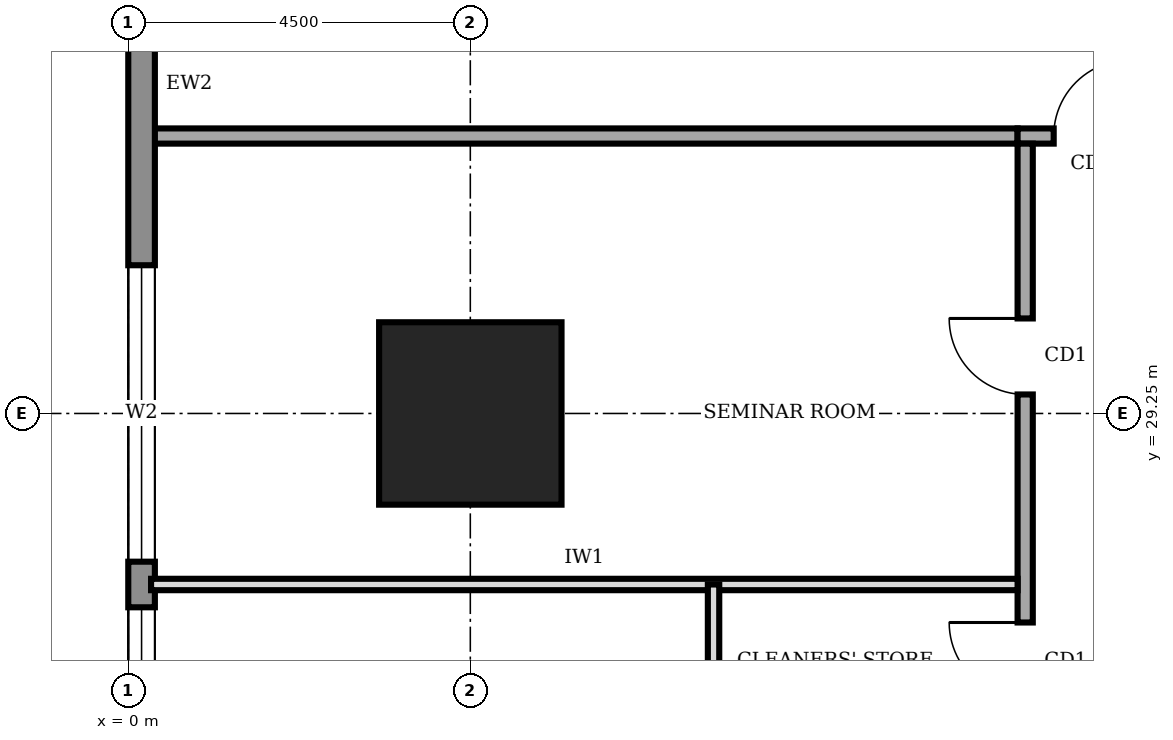
"""IFC4 building model, lengths in metres.
Left out: names, types, materials, properties, quantities, classifications, styles, units other than length and angle.
Written with IfcOpenShell. Run it as: python <this file> out.ifc"""

import sys

from ifc_helpers import new_model, si_unit, direction, frame, frame_2d, origin, origin_2d, place, context, subcontext, project, spatial, rectangle, extrude, element, fill, save


model = new_model("IFC4")
c1 = context("Model", 3, precision=1e-05, world=origin(), true_north=direction((0.0, 1.0)))
c2 = subcontext(c1, "Body", "Model", "MODEL_VIEW")
j1 = project(units=[si_unit("LENGTHUNIT", "METRE"), si_unit("PLANEANGLEUNIT", "RADIAN")], contexts=[c1])
p1 = place(None, origin())
s1 = spatial("IfcSite", under=j1, at=p1, CompositionType="ELEMENT")
p2 = place(p1, origin())
s2 = spatial("IfcBuilding", under=s1, at=p2, CompositionType="ELEMENT")
p3 = place(p2, frame((0.0, 0.0, 49.0)))
s3 = spatial("IfcBuildingStorey", under=s2, at=p3, CompositionType="ELEMENT", Elevation=49.0)
p4 = place(p3, frame((4.5, 29.25, 0.0), z_axis=(0.0, 0.0, 1.0), x_axis=(1.0, 0.0, 0.0)))
e1 = element("IfcColumn", 1, at=p4, inside=s3, PredefinedType="COLUMN", context=c2, shape_type="SweptSolid", body=[
    extrude(rectangle(XDim=2.4, YDim=2.4, at=origin_2d()), origin(), (0.0, 0.0, 1.0), 4.0),
])
p5 = place(p3, frame((0.175, 35.98, 0.0), z_axis=(0.0, 0.0, 1.0), x_axis=(0.0, -1.0, 0.0)))
e2 = element("IfcWall", 2, at=p5, inside=s3, PredefinedType="STANDARD", context=c2, shape_type="SweptSolid", body=[
    extrude(rectangle(XDim=31.46, YDim=0.35, at=frame_2d((15.73, 0.0))), origin(), (0.0, 0.0, 1.0), 3.75),
])
p6 = place(p5, frame((27.21, 0.0, 0.6)))
e3 = element("IfcOpeningElement", 3, at=p6, cuts=e2, PredefinedType="OPENING", context=c2, shape_type="SweptSolid", body=[
    extrude(rectangle(XDim=3.9, YDim=2.6, at=frame_2d((1.95, 1.3))), frame((0.0, 0.185, 0.0), z_axis=(0.0, -1.0, 0.0), x_axis=(1.0, 0.0, 0.0)), (0.0, 0.0, 1.0), 0.37),
])
p7 = place(p5, frame((22.78, 0.0, 0.6)))
e4 = element("IfcOpeningElement", 4, at=p7, cuts=e2, PredefinedType="OPENING", context=c2, shape_type="SweptSolid", body=[
    extrude(rectangle(XDim=3.9, YDim=2.6, at=frame_2d((1.95, 1.3))), frame((0.0, 0.185, 0.0), z_axis=(0.0, -1.0, 0.0), x_axis=(1.0, 0.0, 0.0)), (0.0, 0.0, 1.0), 0.37),
])
p8 = place(p5, frame((18.28, 0.0, 0.6)))
e5 = element("IfcOpeningElement", 5, at=p8, cuts=e2, PredefinedType="OPENING", context=c2, shape_type="SweptSolid", body=[
    extrude(rectangle(XDim=3.9, YDim=2.6, at=frame_2d((1.95, 1.3))), frame((0.0, 0.185, 0.0), z_axis=(0.0, -1.0, 0.0), x_axis=(1.0, 0.0, 0.0)), (0.0, 0.0, 1.0), 0.37),
])
p9 = place(p5, frame((13.78, 0.0, 0.6)))
e6 = element("IfcOpeningElement", 6, at=p9, cuts=e2, PredefinedType="OPENING", context=c2, shape_type="SweptSolid", body=[
    extrude(rectangle(XDim=3.9, YDim=2.6, at=frame_2d((1.95, 1.3))), frame((0.0, 0.185, 0.0), z_axis=(0.0, -1.0, 0.0), x_axis=(1.0, 0.0, 0.0)), (0.0, 0.0, 1.0), 0.37),
])
p10 = place(p5, frame((9.28, 0.0, 0.6)))
e7 = element("IfcOpeningElement", 7, at=p10, cuts=e2, PredefinedType="OPENING", context=c2, shape_type="SweptSolid", body=[
    extrude(rectangle(XDim=3.9, YDim=2.6, at=frame_2d((1.95, 1.3))), frame((0.0, 0.185, 0.0), z_axis=(0.0, -1.0, 0.0), x_axis=(1.0, 0.0, 0.0)), (0.0, 0.0, 1.0), 0.37),
])
p11 = place(p5, frame((4.78, 0.0, 0.6)))
e8 = element("IfcOpeningElement", 8, at=p11, cuts=e2, PredefinedType="OPENING", context=c2, shape_type="SweptSolid", body=[
    extrude(rectangle(XDim=3.9, YDim=2.6, at=frame_2d((1.95, 1.3))), frame((0.0, 0.185, 0.0), z_axis=(0.0, -1.0, 0.0), x_axis=(1.0, 0.0, 0.0)), (0.0, 0.0, 1.0), 0.37),
])
p12 = place(p3, frame((28.6, 32.9, 0.0), z_axis=(0.0, 0.0, 1.0), x_axis=(-1.0, 0.0, 0.0)))
e9 = element("IfcWall", 9, at=p12, inside=s3, PredefinedType="SOLIDWALL", context=c2, shape_type="SweptSolid", body=[
    extrude(rectangle(XDim=16.9, YDim=0.2, at=frame_2d((8.45, 0.0))), origin(), (0.0, 0.0, 1.0), 3.75),
])
p13 = place(p12, frame((15.425, 0.0, 0.0)))
e10 = element("IfcOpeningElement", 10, at=p13, cuts=e9, PredefinedType="OPENING", context=c2, shape_type="SweptSolid", body=[
    extrude(rectangle(XDim=1.0, YDim=2.1, at=frame_2d((0.5, 1.05))), frame((0.0, 0.11, 0.0), z_axis=(0.0, -1.0, 0.0), x_axis=(1.0, 0.0, 0.0)), (0.0, 0.0, 1.0), 0.22),
])
p14 = place(p12, frame((12.35, 0.0, 0.0)))
e11 = element("IfcOpeningElement", 11, at=p14, cuts=e9, PredefinedType="OPENING", context=c2, shape_type="SweptSolid", body=[
    extrude(rectangle(XDim=1.0, YDim=2.1, at=frame_2d((0.5, 1.05))), frame((0.0, 0.11, 0.0), z_axis=(0.0, -1.0, 0.0), x_axis=(1.0, 0.0, 0.0)), (0.0, 0.0, 1.0), 0.22),
])
p15 = place(p12, frame((5.6, 0.0, 0.0)))
e12 = element("IfcOpeningElement", 12, at=p15, cuts=e9, PredefinedType="OPENING", context=c2, shape_type="SweptSolid", body=[
    extrude(rectangle(XDim=1.0, YDim=2.1, at=frame_2d((0.5, 1.05))), frame((0.0, 0.11, 0.0), z_axis=(0.0, -1.0, 0.0), x_axis=(1.0, 0.0, 0.0)), (0.0, 0.0, 1.0), 0.22),
])
p16 = place(p12, frame((0.275, 0.0, 0.0)))
e13 = element("IfcOpeningElement", 13, at=p16, cuts=e9, PredefinedType="OPENING", context=c2, shape_type="SweptSolid", body=[
    extrude(rectangle(XDim=1.0, YDim=2.1, at=frame_2d((0.5, 1.05))), frame((0.0, 0.11, 0.0), z_axis=(0.0, -1.0, 0.0), x_axis=(1.0, 0.0, 0.0)), (0.0, 0.0, 1.0), 0.22),
])
p17 = place(p3, frame((11.8, 32.8, 0.0), z_axis=(0.0, 0.0, 1.0), x_axis=(0.0, -1.0, 0.0)))
e14 = element("IfcWall", 14, at=p17, inside=s3, PredefinedType="SOLIDWALL", context=c2, shape_type="SweptSolid", body=[
    extrude(rectangle(XDim=23.8, YDim=0.2, at=frame_2d((11.9, 0.0))), origin(), (0.0, 0.0, 1.0), 3.75),
])
p18 = place(p17, frame((21.05, 0.0, 0.0)))
e15 = element("IfcOpeningElement", 15, at=p18, cuts=e14, PredefinedType="OPENING", context=c2, shape_type="SweptSolid", body=[
    extrude(rectangle(XDim=1.0, YDim=2.1, at=frame_2d((0.5, 1.05))), frame((0.0, 0.11, 0.0), z_axis=(0.0, -1.0, 0.0), x_axis=(1.0, 0.0, 0.0)), (0.0, 0.0, 1.0), 0.22),
])
p19 = place(p17, frame((17.15, 0.0, 0.0)))
e16 = element("IfcOpeningElement", 16, at=p19, cuts=e14, PredefinedType="OPENING", context=c2, shape_type="SweptSolid", body=[
    extrude(rectangle(XDim=0.9, YDim=2.1, at=frame_2d((0.45, 1.05))), frame((0.0, 0.11, 0.0), z_axis=(0.0, -1.0, 0.0), x_axis=(1.0, 0.0, 0.0)), (0.0, 0.0, 1.0), 0.22),
])
p20 = place(p17, frame((12.35, 0.0, 0.0)))
e17 = element("IfcOpeningElement", 17, at=p20, cuts=e14, PredefinedType="OPENING", context=c2, shape_type="SweptSolid", body=[
    extrude(rectangle(XDim=0.9, YDim=2.1, at=frame_2d((0.45, 1.05))), frame((0.0, 0.11, 0.0), z_axis=(0.0, -1.0, 0.0), x_axis=(1.0, 0.0, 0.0)), (0.0, 0.0, 1.0), 0.22),
])
p21 = place(p17, frame((9.3, 0.0, 0.0)))
e18 = element("IfcOpeningElement", 18, at=p21, cuts=e14, PredefinedType="OPENING", context=c2, shape_type="SweptSolid", body=[
    extrude(rectangle(XDim=0.9, YDim=2.1, at=frame_2d((0.45, 1.05))), frame((0.0, 0.11, 0.0), z_axis=(0.0, -1.0, 0.0), x_axis=(1.0, 0.0, 0.0)), (0.0, 0.0, 1.0), 0.22),
])
p22 = place(p17, frame((6.3, 0.0, 0.0)))
e19 = element("IfcOpeningElement", 19, at=p22, cuts=e14, PredefinedType="OPENING", context=c2, shape_type="SweptSolid", body=[
    extrude(rectangle(XDim=1.0, YDim=2.1, at=frame_2d((0.5, 1.05))), frame((0.0, 0.11, 0.0), z_axis=(0.0, -1.0, 0.0), x_axis=(1.0, 0.0, 0.0)), (0.0, 0.0, 1.0), 0.22),
])
p23 = place(p17, frame((14.4, 0.0, 0.0)))
e20 = element("IfcOpeningElement", 20, at=p23, cuts=e14, PredefinedType="OPENING", context=c2, shape_type="SweptSolid", body=[
    extrude(rectangle(XDim=1.0, YDim=2.1, at=frame_2d((0.5, 1.05))), frame((0.0, 0.11, 0.0), z_axis=(0.0, -1.0, 0.0), x_axis=(1.0, 0.0, 0.0)), (0.0, 0.0, 1.0), 0.22),
])
p24 = place(p17, frame((2.3, 0.0, 0.0)))
e21 = element("IfcOpeningElement", 21, at=p24, cuts=e14, PredefinedType="OPENING", context=c2, shape_type="SweptSolid", body=[
    extrude(rectangle(XDim=1.0, YDim=2.1, at=frame_2d((0.5, 1.05))), frame((0.0, 0.11, 0.0), z_axis=(0.0, -1.0, 0.0), x_axis=(1.0, 0.0, 0.0)), (0.0, 0.0, 1.0), 0.22),
])
p25 = place(p3, frame((0.3, 32.9, 0.0), z_axis=(0.0, 0.0, 1.0), x_axis=(1.0, 0.0, 0.0)))
e22 = element("IfcWall", 22, at=p25, inside=s3, PredefinedType="SOLIDWALL", context=c2, shape_type="SweptSolid", body=[
    extrude(rectangle(XDim=11.4, YDim=0.2, at=frame_2d((5.7, 0.0))), origin(), (0.0, 0.0, 1.0), 3.75),
])
p26 = place(p3, frame((0.3, 27.0, 0.0), z_axis=(0.0, 0.0, 1.0), x_axis=(1.0, 0.0, 0.0)))
e23 = element("IfcWall", 23, at=p26, inside=s3, PredefinedType="PARTITIONING", context=c2, shape_type="SweptSolid", body=[
    extrude(rectangle(XDim=11.4, YDim=0.15, at=frame_2d((5.7, 0.0))), origin(), (0.0, 0.0, 1.0), 3.75),
])
p27 = place(p3, frame((7.7, 25.0, 0.0), z_axis=(0.0, 0.0, 1.0), x_axis=(0.0, 1.0, 0.0)))
e24 = element("IfcWall", 24, at=p27, inside=s3, PredefinedType="PARTITIONING", context=c2, shape_type="SweptSolid", body=[
    extrude(rectangle(XDim=2.0, YDim=0.15, at=frame_2d((1.0, 0.0))), origin(), (0.0, 0.0, 1.0), 3.75),
])
p28 = place(p10, origin())
e25 = element("IfcWindow", 25, at=p28, inside=s3, PartitioningType="SINGLE_PANEL", PredefinedType="WINDOW", context=c2, shape_type="SweptSolid", body=[
    extrude(rectangle(XDim=3.9, YDim=2.6, at=frame_2d((1.95, 1.3))), frame((0.0, 0.03, 0.0), z_axis=(0.0, -1.0, 0.0), x_axis=(1.0, 0.0, 0.0)), (0.0, 0.0, 1.0), 0.06),
])
fill(e7, e25)
p29 = place(p11, origin())
e26 = element("IfcWindow", 26, at=p29, inside=s3, PartitioningType="SINGLE_PANEL", PredefinedType="WINDOW", context=c2, shape_type="SweptSolid", body=[
    extrude(rectangle(XDim=3.9, YDim=2.6, at=frame_2d((1.95, 1.3))), frame((0.0, 0.03, 0.0), z_axis=(0.0, -1.0, 0.0), x_axis=(1.0, 0.0, 0.0)), (0.0, 0.0, 1.0), 0.06),
])
fill(e8, e26)
p30 = place(p13, frame((1.0, 0.0, 0.0), z_axis=(0.0, 0.0, 1.0), x_axis=(-1.0, 0.0, 0.0)))
e27 = element("IfcDoor", 27, at=p30, inside=s3, OperationType="SINGLE_SWING_RIGHT", PredefinedType="DOOR", context=c2, shape_type="SweptSolid", body=[
    extrude(rectangle(XDim=1.0, YDim=2.1, at=frame_2d((0.5, 1.05))), frame((0.0, 0.025, 0.0), z_axis=(0.0, -1.0, 0.0), x_axis=(1.0, 0.0, 0.0)), (0.0, 0.0, 1.0), 0.05),
])
fill(e10, e27)
p31 = place(p22, frame((1.0, 0.0, 0.0), z_axis=(0.0, 0.0, 1.0), x_axis=(-1.0, 0.0, 0.0)))
e28 = element("IfcDoor", 28, at=p31, inside=s3, OperationType="SINGLE_SWING_RIGHT", PredefinedType="DOOR", context=c2, shape_type="SweptSolid", body=[
    extrude(rectangle(XDim=1.0, YDim=2.1, at=frame_2d((0.5, 1.05))), frame((0.0, 0.025, 0.0), z_axis=(0.0, -1.0, 0.0), x_axis=(1.0, 0.0, 0.0)), (0.0, 0.0, 1.0), 0.05),
])
fill(e19, e28)
p32 = place(p24, frame((1.0, 0.0, 0.0), z_axis=(0.0, 0.0, 1.0), x_axis=(-1.0, 0.0, 0.0)))
e29 = element("IfcDoor", 29, at=p32, inside=s3, OperationType="SINGLE_SWING_RIGHT", PredefinedType="DOOR", context=c2, shape_type="SweptSolid", body=[
    extrude(rectangle(XDim=1.0, YDim=2.1, at=frame_2d((0.5, 1.05))), frame((0.0, 0.025, 0.0), z_axis=(0.0, -1.0, 0.0), x_axis=(1.0, 0.0, 0.0)), (0.0, 0.0, 1.0), 0.05),
])
fill(e21, e29)
save(model, sys.argv[1])
